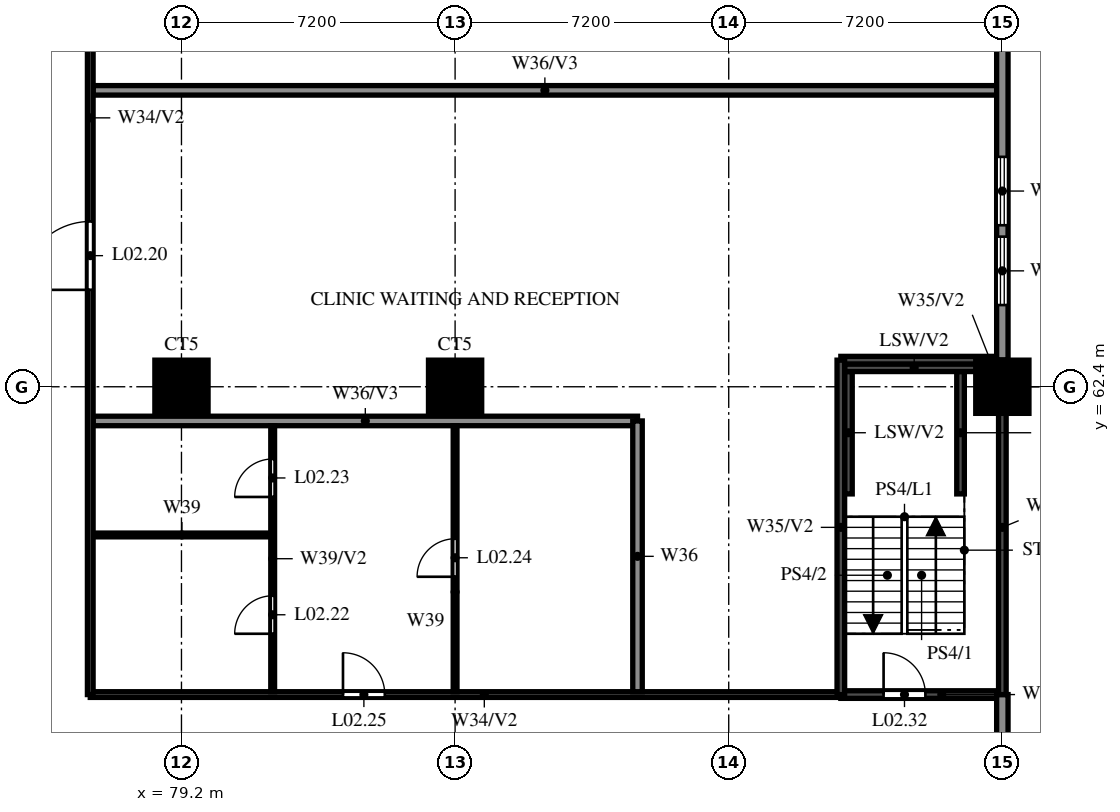
"""IFC4 building model, lengths in metres.
Left out: names, types, materials, properties, quantities, classifications, styles, units other than length and angle.
Written with IfcOpenShell. Run it as: python <this file> out.ifc"""

import sys

from ifc_helpers import new_model, si_unit, direction, frame, frame_2d, origin, origin_2d, place, context, subcontext, project, spatial, rectangle, circle, extrude, source, transform, mapped, element, fill, save


model = new_model("IFC4")
c1 = context("Model", 3, precision=1e-05, world=origin(), true_north=direction((0.0, 1.0)))
c2 = subcontext(c1, "Body", "Model", "MODEL_VIEW")
j1 = project(units=[si_unit("LENGTHUNIT", "METRE"), si_unit("PLANEANGLEUNIT", "RADIAN")], contexts=[c1])
p1 = place(None, origin())
s1 = spatial("IfcSite", under=j1, at=p1, CompositionType="ELEMENT")
p2 = place(p1, origin())
s2 = spatial("IfcBuilding", under=s1, at=p2, CompositionType="ELEMENT")
p3 = place(p2, frame((0.0, 0.0, 13.2)))
s3 = spatial("IfcBuildingStorey", under=s2, at=p3, CompositionType="ELEMENT", Elevation=13.2)
m1 = source(origin(), c2, "Body", "SweptSolid", [
    extrude(circle(Radius=0.7, at=origin_2d()), origin(), (0.0, 0.0, 1.0), 3.8),
])
for number, where, z_axis, x_axis in (
    (1, (79.2, 62.4, 0.0), (0.0, 0.0, 1.0), (1.0, 0.0, 0.0)),
    (2, (86.4, 62.4, 0.0), (0.0, 0.0, 1.0), (1.0, 0.0, 0.0)),
    (3, (100.8, 62.4, 0.0), (0.0, 0.0, 1.0), (1.0, 0.0, 0.0)),
):
    element("IfcColumn", number, at=place(p3, frame(where, z_axis=z_axis, x_axis=x_axis)), inside=s3, PredefinedType="COLUMN", context=c2, shape_type="MappedRepresentation", body=[
        mapped(m1, transform((0.0, 0.0, 0.0))),
    ])
for number, where, z_axis, x_axis in (
    (4, (96.75, 59.58, 0.0), (0.0, 0.0, 1.0), (0.0, 1.0, 0.0)),
    (5, (99.7, 59.58, 0.0), (0.0, 0.0, 1.0), (0.0, 1.0, 0.0)),
):
    element("IfcWall", number, at=place(p3, frame(where, z_axis=z_axis, x_axis=x_axis)), inside=s3, PredefinedType="SOLIDWALL", context=c2, shape_type="SweptSolid", body=[
        extrude(rectangle(XDim=3.22, YDim=0.2, at=frame_2d((1.61, 0.0))), origin(), (0.0, 0.0, 1.0), 1.9),
    ])
p4 = place(p3, frame((96.65, 62.9, 0.0), z_axis=(0.0, 0.0, 1.0), x_axis=(1.0, 0.0, 0.0)))
e6 = element("IfcWall", 6, at=p4, inside=s3, PredefinedType="SOLIDWALL", context=c2, shape_type="SweptSolid", body=[
    extrude(rectangle(XDim=3.66, YDim=0.2, at=frame_2d((1.83, 0.0))), origin(), (0.0, 0.0, 1.0), 1.9),
])
p5 = place(p3, frame((76.8, 54.3, 0.0), z_axis=(0.0, 0.0, 1.0), x_axis=(1.0, 0.0, 0.0)))
e7 = element("IfcWall", 7, at=p5, inside=s3, PredefinedType="PARTITIONING", context=c2, shape_type="SweptSolid", body=[
    extrude(rectangle(XDim=19.75, YDim=0.15, at=frame_2d((9.875, 0.0))), origin(), (0.0, 0.0, 1.0), 2.6),
])
p6 = place(p5, frame((6.65, 0.0, 0.0)))
e8 = element("IfcOpeningElement", 8, at=p6, cuts=e7, PredefinedType="OPENING", context=c2, shape_type="SweptSolid", body=[
    extrude(rectangle(XDim=1.1, YDim=2.1, at=frame_2d((0.55, 1.05))), frame((0.0, 0.085, 0.0), z_axis=(0.0, -1.0, 0.0), x_axis=(1.0, 0.0, 0.0)), (0.0, 0.0, 1.0), 0.17),
])
p7 = place(p3, frame((96.55, 54.3, 0.0), z_axis=(0.0, 0.0, 1.0), x_axis=(1.0, 0.0, 0.0)))
e9 = element("IfcWall", 9, at=p7, inside=s3, PredefinedType="SOLIDWALL", context=c2, shape_type="SweptSolid", body=[
    extrude(rectangle(XDim=4.25, YDim=0.2, at=frame_2d((2.125, 0.0))), origin(), (0.0, 0.0, 1.0), 3.8),
])
p8 = place(p7, frame((1.125, 0.0, 0.0)))
e10 = element("IfcOpeningElement", 10, at=p8, cuts=e9, PredefinedType="OPENING", context=c2, shape_type="SweptSolid", body=[
    extrude(rectangle(XDim=1.1, YDim=2.1, at=frame_2d((0.55, 1.05))), frame((0.0, 0.11, 0.0), z_axis=(0.0, -1.0, 0.0), x_axis=(1.0, 0.0, 0.0)), (0.0, 0.0, 1.0), 0.22),
])
p9 = place(p3, frame((76.875, 58.5, 0.0), z_axis=(0.0, 0.0, 1.0), x_axis=(1.0, 0.0, 0.0)))
e11 = element("IfcWall", 11, at=p9, inside=s3, PredefinedType="PARTITIONING", context=c2, shape_type="SweptSolid", body=[
    extrude(rectangle(XDim=4.675, YDim=0.1, at=frame_2d((2.337, 0.0))), origin(), (0.0, 0.0, 1.0), 2.6),
])
p10 = place(p3, frame((76.875, 61.5, 0.0), z_axis=(0.0, 0.0, 1.0), x_axis=(1.0, 0.0, 0.0)))
e12 = element("IfcWall", 12, at=p10, inside=s3, PredefinedType="SOLIDWALL", context=c2, shape_type="SweptSolid", body=[
    extrude(rectangle(XDim=14.325, YDim=0.25, at=frame_2d((7.163, 0.0))), origin(), (0.0, 0.0, 1.0), 2.6),
])
p11 = place(p3, frame((96.55, 63.1, 0.0), z_axis=(0.0, 0.0, 1.0), x_axis=(1.0, 0.0, 0.0)))
e13 = element("IfcWall", 13, at=p11, inside=s3, PredefinedType="SOLIDWALL", context=c2, shape_type="SweptSolid", body=[
    extrude(rectangle(XDim=4.25, YDim=0.2, at=frame_2d((2.125, 0.0))), origin(), (0.0, 0.0, 1.0), 3.8),
])
p12 = place(p3, frame((76.875, 70.2, 0.0), z_axis=(0.0, 0.0, 1.0), x_axis=(1.0, 0.0, 0.0)))
e14 = element("IfcWall", 14, at=p12, inside=s3, PredefinedType="SOLIDWALL", context=c2, shape_type="SweptSolid", body=[
    extrude(rectangle(XDim=23.775, YDim=0.25, at=frame_2d((11.887, 0.0))), origin(), (0.0, 0.0, 1.0), 2.6),
])
p13 = place(p3, frame((76.8, 54.3, 0.0), z_axis=(0.0, 0.0, 1.0), x_axis=(0.0, 1.0, 0.0)))
e15 = element("IfcWall", 15, at=p13, inside=s3, PredefinedType="PARTITIONING", context=c2, shape_type="SweptSolid", body=[
    extrude(rectangle(XDim=31.95, YDim=0.15, at=frame_2d((15.975, 0.0))), origin(), (0.0, 0.0, 1.0), 2.6),
])
p14 = place(p13, frame((10.65, 0.0, 0.0)))
e16 = element("IfcOpeningElement", 16, at=p14, cuts=e15, PredefinedType="OPENING", context=c2, shape_type="SweptSolid", body=[
    extrude(rectangle(XDim=1.8, YDim=2.1, at=frame_2d((0.9, 1.05))), frame((0.0, 0.085, 0.0), z_axis=(0.0, -1.0, 0.0), x_axis=(1.0, 0.0, 0.0)), (0.0, 0.0, 1.0), 0.17),
])
p15 = place(p13, frame((23.45, 0.0, 0.0)))
e17 = element("IfcOpeningElement", 17, at=p15, cuts=e15, PredefinedType="OPENING", context=c2, shape_type="SweptSolid", body=[
    extrude(rectangle(XDim=1.1, YDim=2.1, at=frame_2d((0.55, 1.05))), frame((0.0, 0.085, 0.0), z_axis=(0.0, -1.0, 0.0), x_axis=(1.0, 0.0, 0.0)), (0.0, 0.0, 1.0), 0.17),
])
p16 = place(p3, frame((81.6, 54.375, 0.0), z_axis=(0.0, 0.0, 1.0), x_axis=(0.0, 1.0, 0.0)))
e18 = element("IfcWall", 18, at=p16, inside=s3, PredefinedType="PARTITIONING", context=c2, shape_type="SweptSolid", body=[
    extrude(rectangle(XDim=7.0, YDim=0.1, at=frame_2d((3.5, 0.0))), origin(), (0.0, 0.0, 1.0), 3.8),
])
p17 = place(p16, frame((1.525, 0.0, 0.0)))
e19 = element("IfcOpeningElement", 19, at=p17, cuts=e18, PredefinedType="OPENING", context=c2, shape_type="SweptSolid", body=[
    extrude(rectangle(XDim=1.0, YDim=2.1, at=frame_2d((0.5, 1.05))), frame((0.0, 0.06, 0.0), z_axis=(0.0, -1.0, 0.0), x_axis=(1.0, 0.0, 0.0)), (0.0, 0.0, 1.0), 0.12),
])
p18 = place(p16, frame((5.125, 0.0, 0.0)))
e20 = element("IfcOpeningElement", 20, at=p18, cuts=e18, PredefinedType="OPENING", context=c2, shape_type="SweptSolid", body=[
    extrude(rectangle(XDim=1.0, YDim=2.1, at=frame_2d((0.5, 1.05))), frame((0.0, 0.06, 0.0), z_axis=(0.0, -1.0, 0.0), x_axis=(1.0, 0.0, 0.0)), (0.0, 0.0, 1.0), 0.12),
])
p19 = place(p3, frame((86.4, 54.375, 0.0), z_axis=(0.0, 0.0, 1.0), x_axis=(0.0, 1.0, 0.0)))
e21 = element("IfcWall", 21, at=p19, inside=s3, PredefinedType="PARTITIONING", context=c2, shape_type="SweptSolid", body=[
    extrude(rectangle(XDim=7.0, YDim=0.1, at=frame_2d((3.5, 0.0))), origin(), (0.0, 0.0, 1.0), 2.6),
])
p20 = place(p19, frame((3.025, 0.0, 0.0)))
e22 = element("IfcOpeningElement", 22, at=p20, cuts=e21, PredefinedType="OPENING", context=c2, shape_type="SweptSolid", body=[
    extrude(rectangle(XDim=1.0, YDim=2.1, at=frame_2d((0.5, 1.05))), frame((0.0, 0.06, 0.0), z_axis=(0.0, -1.0, 0.0), x_axis=(1.0, 0.0, 0.0)), (0.0, 0.0, 1.0), 0.12),
])
p21 = place(p3, frame((91.2, 54.375, 0.0), z_axis=(0.0, 0.0, 1.0), x_axis=(0.0, 1.0, 0.0)))
e23 = element("IfcWall", 23, at=p21, inside=s3, PredefinedType="SOLIDWALL", context=c2, shape_type="SweptSolid", body=[
    extrude(rectangle(XDim=7.125, YDim=0.25, at=frame_2d((3.562, 0.0))), origin(), (0.0, 0.0, 1.0), 3.8),
])
p22 = place(p3, frame((96.55, 54.3, 0.0), z_axis=(0.0, 0.0, 1.0), x_axis=(0.0, 1.0, 0.0)))
e24 = element("IfcWall", 24, at=p22, inside=s3, PredefinedType="SOLIDWALL", context=c2, shape_type="SweptSolid", body=[
    extrude(rectangle(XDim=8.8, YDim=0.2, at=frame_2d((4.4, 0.0))), origin(), (0.0, 0.0, 1.0), 3.8),
])
p23 = place(p3, frame((100.8, 51.1, 0.0), z_axis=(0.0, 0.0, 1.0), x_axis=(0.0, 1.0, 0.0)))
e25 = element("IfcWall", 25, at=p23, inside=s3, PredefinedType="SOLIDWALL", context=c2, shape_type="SweptSolid", body=[
    extrude(rectangle(XDim=3.2, YDim=0.3, at=frame_2d((1.6, 0.0))), origin(), (0.0, 0.0, 1.0), 3.8),
])
p24 = place(p3, frame((100.8, 63.1, 0.0), z_axis=(0.0, 0.0, 1.0), x_axis=(0.0, 1.0, 0.0)))
e26 = element("IfcWall", 26, at=p24, inside=s3, PredefinedType="SOLIDWALL", context=c2, shape_type="SweptSolid", body=[
    extrude(rectangle(XDim=23.3, YDim=0.3, at=frame_2d((11.65, 0.0))), origin(), (0.0, 0.0, 1.0), 3.8),
])
p25 = place(p24, frame((1.45, 0.0, 0.6)))
e27 = element("IfcOpeningElement", 27, at=p25, cuts=e26, PredefinedType="OPENING", context=c2, shape_type="SweptSolid", body=[
    extrude(rectangle(XDim=1.8, YDim=2.4, at=frame_2d((0.9, 1.2))), frame((0.0, 0.16, 0.0), z_axis=(0.0, -1.0, 0.0), x_axis=(1.0, 0.0, 0.0)), (0.0, 0.0, 1.0), 0.32),
])
p26 = place(p24, frame((3.55, 0.0, 0.6)))
e28 = element("IfcOpeningElement", 28, at=p26, cuts=e26, PredefinedType="OPENING", context=c2, shape_type="SweptSolid", body=[
    extrude(rectangle(XDim=1.8, YDim=2.4, at=frame_2d((0.9, 1.2))), frame((0.0, 0.16, 0.0), z_axis=(0.0, -1.0, 0.0), x_axis=(1.0, 0.0, 0.0)), (0.0, 0.0, 1.0), 0.32),
])
p27 = place(p24, frame((8.65, 0.0, 0.6)))
e29 = element("IfcOpeningElement", 29, at=p27, cuts=e26, PredefinedType="OPENING", context=c2, shape_type="SweptSolid", body=[
    extrude(rectangle(XDim=1.8, YDim=2.4, at=frame_2d((0.9, 1.2))), frame((0.0, 0.16, 0.0), z_axis=(0.0, -1.0, 0.0), x_axis=(1.0, 0.0, 0.0)), (0.0, 0.0, 1.0), 0.32),
])
p28 = place(p24, frame((15.85, 0.0, 0.6)))
e30 = element("IfcOpeningElement", 30, at=p28, cuts=e26, PredefinedType="OPENING", context=c2, shape_type="SweptSolid", body=[
    extrude(rectangle(XDim=1.8, YDim=2.4, at=frame_2d((0.9, 1.2))), frame((0.0, 0.16, 0.0), z_axis=(0.0, -1.0, 0.0), x_axis=(1.0, 0.0, 0.0)), (0.0, 0.0, 1.0), 0.32),
])
p29 = place(p24, frame((19.45, 0.0, 0.6)))
e31 = element("IfcOpeningElement", 31, at=p29, cuts=e26, PredefinedType="OPENING", context=c2, shape_type="SweptSolid", body=[
    extrude(rectangle(XDim=1.8, YDim=2.4, at=frame_2d((0.9, 1.2))), frame((0.0, 0.16, 0.0), z_axis=(0.0, -1.0, 0.0), x_axis=(1.0, 0.0, 0.0)), (0.0, 0.0, 1.0), 0.32),
])
p30 = place(p3, frame((100.8, 54.3, 0.0), z_axis=(0.0, 0.0, 1.0), x_axis=(0.0, 1.0, 0.0)))
e32 = element("IfcWall", 32, at=p30, inside=s3, PredefinedType="SOLIDWALL", context=c2, shape_type="SweptSolid", body=[
    extrude(rectangle(XDim=8.8, YDim=0.2, at=frame_2d((4.4, 0.0))), origin(), (0.0, 0.0, 1.0), 3.8),
])
p31 = place(p14, origin())
e33 = element("IfcDoor", 33, at=p31, inside=s3, OperationType="DOUBLE_DOOR_SINGLE_SWING", PredefinedType="DOOR", context=c2, shape_type="SweptSolid", body=[
    extrude(rectangle(XDim=1.8, YDim=2.1, at=frame_2d((0.9, 1.05))), frame((0.0, 0.025, 0.0), z_axis=(0.0, -1.0, 0.0), x_axis=(1.0, 0.0, 0.0)), (0.0, 0.0, 1.0), 0.05),
])
fill(e16, e33)
p32 = place(p17, origin())
e34 = element("IfcDoor", 34, at=p32, inside=s3, OperationType="SINGLE_SWING_LEFT", PredefinedType="DOOR", context=c2, shape_type="SweptSolid", body=[
    extrude(rectangle(XDim=1.0, YDim=2.1, at=frame_2d((0.5, 1.05))), frame((0.0, 0.025, 0.0), z_axis=(0.0, -1.0, 0.0), x_axis=(1.0, 0.0, 0.0)), (0.0, 0.0, 1.0), 0.05),
])
fill(e19, e34)
p33 = place(p18, origin())
e35 = element("IfcDoor", 35, at=p33, inside=s3, OperationType="SINGLE_SWING_RIGHT", PredefinedType="DOOR", context=c2, shape_type="SweptSolid", body=[
    extrude(rectangle(XDim=1.0, YDim=2.1, at=frame_2d((0.5, 1.05))), frame((0.0, 0.025, 0.0), z_axis=(0.0, -1.0, 0.0), x_axis=(1.0, 0.0, 0.0)), (0.0, 0.0, 1.0), 0.05),
])
fill(e20, e35)
p34 = place(p20, origin())
e36 = element("IfcDoor", 36, at=p34, inside=s3, OperationType="SINGLE_SWING_RIGHT", PredefinedType="DOOR", context=c2, shape_type="SweptSolid", body=[
    extrude(rectangle(XDim=1.0, YDim=2.1, at=frame_2d((0.5, 1.05))), frame((0.0, 0.025, 0.0), z_axis=(0.0, -1.0, 0.0), x_axis=(1.0, 0.0, 0.0)), (0.0, 0.0, 1.0), 0.05),
])
fill(e22, e36)
p35 = place(p6, origin())
e37 = element("IfcDoor", 37, at=p35, inside=s3, OperationType="SINGLE_SWING_LEFT", PredefinedType="DOOR", context=c2, shape_type="SweptSolid", body=[
    extrude(rectangle(XDim=1.1, YDim=2.1, at=frame_2d((0.55, 1.05))), frame((0.0, 0.025, 0.0), z_axis=(0.0, -1.0, 0.0), x_axis=(1.0, 0.0, 0.0)), (0.0, 0.0, 1.0), 0.05),
])
fill(e8, e37)
p36 = place(p8, origin())
e38 = element("IfcDoor", 38, at=p36, inside=s3, OperationType="SINGLE_SWING_LEFT", PredefinedType="DOOR", context=c2, shape_type="SweptSolid", body=[
    extrude(rectangle(XDim=1.1, YDim=2.1, at=frame_2d((0.55, 1.05))), frame((0.0, 0.025, 0.0), z_axis=(0.0, -1.0, 0.0), x_axis=(1.0, 0.0, 0.0)), (0.0, 0.0, 1.0), 0.05),
])
fill(e10, e38)
p37 = place(p25, origin())
e39 = element("IfcWindow", 39, at=p37, inside=s3, PartitioningType="DOUBLE_PANEL_VERTICAL", PredefinedType="WINDOW", context=c2, shape_type="SweptSolid", body=[
    extrude(rectangle(XDim=1.8, YDim=2.4, at=frame_2d((0.9, 1.2))), frame((0.0, 0.03, 0.0), z_axis=(0.0, -1.0, 0.0), x_axis=(1.0, 0.0, 0.0)), (0.0, 0.0, 1.0), 0.06),
])
fill(e27, e39)
p38 = place(p26, origin())
e40 = element("IfcWindow", 40, at=p38, inside=s3, PartitioningType="DOUBLE_PANEL_VERTICAL", PredefinedType="WINDOW", context=c2, shape_type="SweptSolid", body=[
    extrude(rectangle(XDim=1.8, YDim=2.4, at=frame_2d((0.9, 1.2))), frame((0.0, 0.03, 0.0), z_axis=(0.0, -1.0, 0.0), x_axis=(1.0, 0.0, 0.0)), (0.0, 0.0, 1.0), 0.06),
])
fill(e28, e40)
save(model, sys.argv[1])
